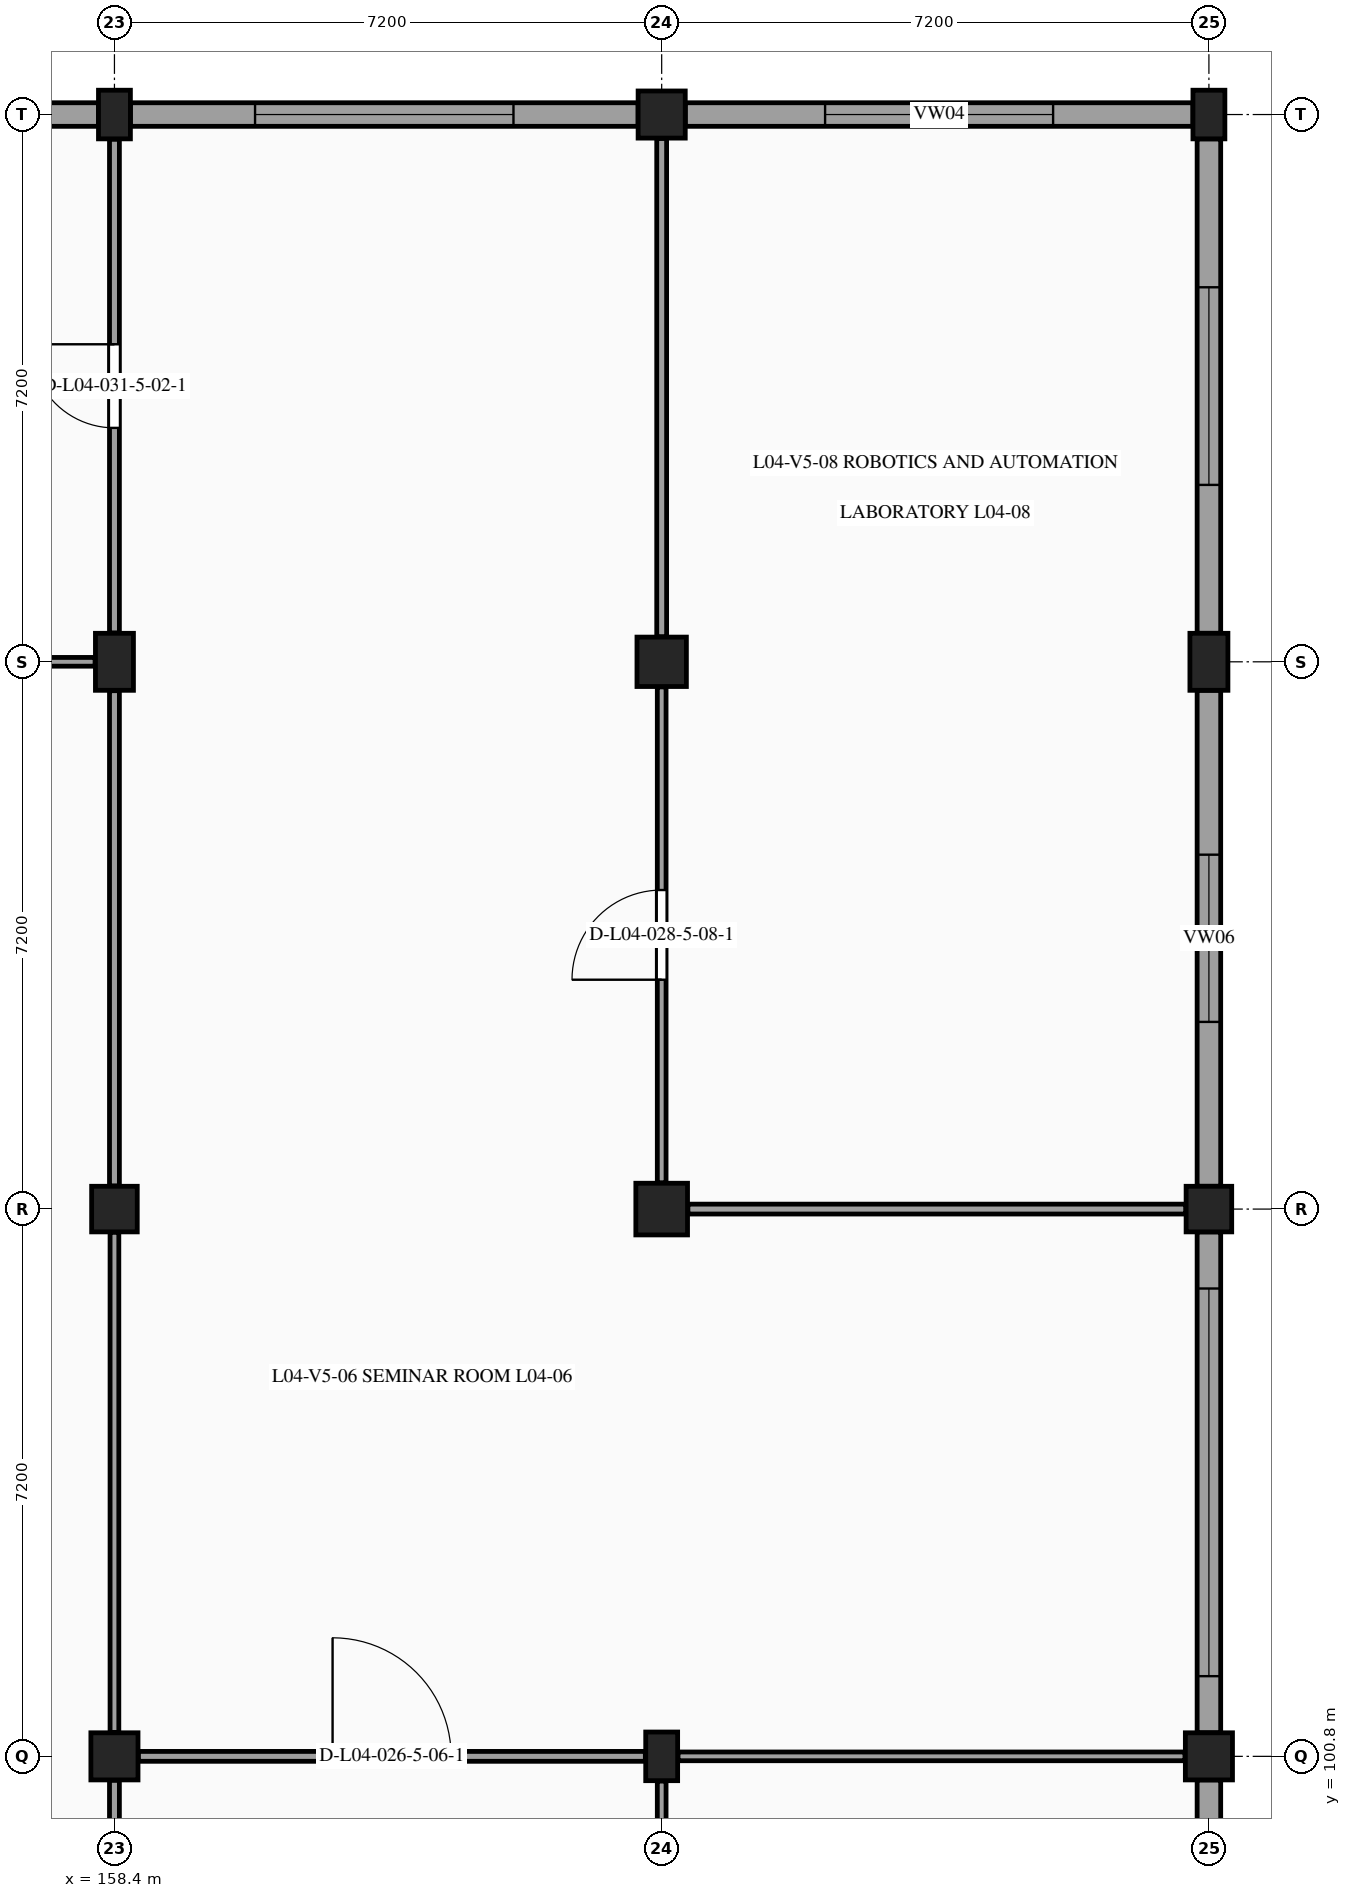
"""IFC4 building model, lengths in metres.
Left out: names, types, materials, properties, quantities, classifications, styles, units other than length and angle.
Written with IfcOpenShell. Run it as: python <this file> out.ifc"""

import sys

from ifc_helpers import new_model, si_unit, direction, frame, frame_2d, origin, origin_2d, place, context, subcontext, project, spatial, rectangle, extrude, element, fill, save


model = new_model("IFC4")
c1 = context("Model", 3, precision=1e-05, world=origin(), true_north=direction((0.0, 1.0)))
c2 = subcontext(c1, "Body", "Model", "MODEL_VIEW")
j1 = project(units=[si_unit("LENGTHUNIT", "METRE"), si_unit("PLANEANGLEUNIT", "RADIAN")], contexts=[c1])
p1 = place(None, origin())
s1 = spatial("IfcSite", under=j1, at=p1, CompositionType="ELEMENT")
p2 = place(p1, origin())
s2 = spatial("IfcBuilding", under=s1, at=p2, CompositionType="ELEMENT")
p3 = place(p2, frame((0.0, 0.0, 18.6)))
s3 = spatial("IfcBuildingStorey", under=s2, at=p3, CompositionType="ELEMENT", Elevation=18.6)
p4 = place(p3, frame((158.4, 100.8, 0.0), z_axis=(0.0, 0.0, 1.0), x_axis=(1.0, 0.0, 0.0)))
e1 = element("IfcColumn", 1, at=p4, inside=s3, PredefinedType="COLUMN", context=c2, shape_type="SweptSolid", body=[
    extrude(rectangle(XDim=0.62, YDim=0.62, at=origin_2d()), origin(), (0.0, 0.0, 1.0), 4.2),
])
p5 = place(p3, frame((158.4, 108.0, 0.0), z_axis=(0.0, 0.0, 1.0), x_axis=(1.0, 0.0, 0.0)))
e2 = element("IfcColumn", 2, at=p5, inside=s3, PredefinedType="COLUMN", context=c2, shape_type="SweptSolid", body=[
    extrude(rectangle(XDim=0.6, YDim=0.6, at=origin_2d()), origin(), (0.0, 0.0, 1.0), 4.2),
])
p6 = place(p3, frame((158.4, 115.2, 0.0), z_axis=(0.0, 0.0, 1.0), x_axis=(1.0, 0.0, 0.0)))
e3 = element("IfcColumn", 3, at=p6, inside=s3, PredefinedType="COLUMN", context=c2, shape_type="SweptSolid", body=[
    extrude(rectangle(XDim=0.5, YDim=0.75, at=origin_2d()), origin(), (0.0, 0.0, 1.0), 4.2),
])
for number, where, z_axis, x_axis in (
    (4, (158.4, 122.4, 0.0), (0.0, 0.0, 1.0), (1.0, 0.0, 0.0)),
    (5, (165.6, 100.8, 0.0), (0.0, 0.0, 1.0), (1.0, 0.0, 0.0)),
):
    element("IfcColumn", number, at=place(p3, frame(where, z_axis=z_axis, x_axis=x_axis)), inside=s3, PredefinedType="PILASTER", context=c2, shape_type="SweptSolid", body=[
        extrude(rectangle(XDim=0.42, YDim=0.64, at=origin_2d()), origin(), (0.0, 0.0, 1.0), 4.2),
    ])
p7 = place(p3, frame((165.6, 108.0, 0.0), z_axis=(0.0, 0.0, 1.0), x_axis=(1.0, 0.0, 0.0)))
e6 = element("IfcColumn", 6, at=p7, inside=s3, PredefinedType="COLUMN", context=c2, shape_type="SweptSolid", body=[
    extrude(rectangle(XDim=0.68, YDim=0.68, at=origin_2d()), origin(), (0.0, 0.0, 1.0), 4.2),
])
p8 = place(p3, frame((165.6, 115.2, 0.0), z_axis=(0.0, 0.0, 1.0), x_axis=(1.0, 0.0, 0.0)))
e7 = element("IfcColumn", 7, at=p8, inside=s3, PredefinedType="COLUMN", context=c2, shape_type="SweptSolid", body=[
    extrude(rectangle(XDim=0.65, YDim=0.65, at=origin_2d()), origin(), (0.0, 0.0, 1.0), 4.2),
])
for number, where, z_axis, x_axis in (
    (8, (165.6, 122.4, 0.0), (0.0, 0.0, 1.0), (1.0, 0.0, 0.0)),
    (9, (172.8, 100.8, 0.0), (0.0, 0.0, 1.0), (1.0, 0.0, 0.0)),
):
    element("IfcColumn", number, at=place(p3, frame(where, z_axis=z_axis, x_axis=x_axis)), inside=s3, PredefinedType="COLUMN", context=c2, shape_type="SweptSolid", body=[
        extrude(rectangle(XDim=0.62, YDim=0.62, at=origin_2d()), origin(), (0.0, 0.0, 1.0), 4.2),
    ])
p9 = place(p3, frame((172.8, 108.0, 0.0), z_axis=(0.0, 0.0, 1.0), x_axis=(1.0, 0.0, 0.0)))
e10 = element("IfcColumn", 10, at=p9, inside=s3, PredefinedType="COLUMN", context=c2, shape_type="SweptSolid", body=[
    extrude(rectangle(XDim=0.6, YDim=0.6, at=origin_2d()), origin(), (0.0, 0.0, 1.0), 4.2),
])
p10 = place(p3, frame((172.8, 115.2, 0.0), z_axis=(0.0, 0.0, 1.0), x_axis=(1.0, 0.0, 0.0)))
e11 = element("IfcColumn", 11, at=p10, inside=s3, PredefinedType="COLUMN", context=c2, shape_type="SweptSolid", body=[
    extrude(rectangle(XDim=0.5, YDim=0.75, at=origin_2d()), origin(), (0.0, 0.0, 1.0), 4.2),
])
p11 = place(p3, frame((172.8, 122.4, 0.0), z_axis=(0.0, 0.0, 1.0), x_axis=(1.0, 0.0, 0.0)))
e12 = element("IfcColumn", 12, at=p11, inside=s3, PredefinedType="PILASTER", context=c2, shape_type="SweptSolid", body=[
    extrude(rectangle(XDim=0.42, YDim=0.64, at=origin_2d()), origin(), (0.0, 0.0, 1.0), 4.2),
])
p12 = place(p3, frame((151.51, 122.4, 0.0), z_axis=(0.0, 0.0, 1.0), x_axis=(1.0, 0.0, 0.0)))
e13 = element("IfcWall", 13, at=p12, inside=s3, PredefinedType="STANDARD", context=c2, shape_type="SweptSolid", body=[
    extrude(rectangle(XDim=6.68, YDim=0.31, at=frame_2d((3.34, 0.0))), origin(), (0.0, 0.0, 1.0), 3.21),
])
p13 = place(p12, frame((1.34, 0.0, 0.98)))
e14 = element("IfcOpeningElement", 14, at=p13, cuts=e13, PredefinedType="OPENING", context=c2, shape_type="SweptSolid", body=[
    extrude(rectangle(XDim=4.0, YDim=1.55, at=frame_2d((2.0, 0.775))), frame((0.0, 0.165, 0.0), z_axis=(0.0, -1.0, 0.0), x_axis=(1.0, 0.0, 0.0)), (0.0, 0.0, 1.0), 0.33),
])
p14 = place(p3, frame((158.61, 122.4, 0.0), z_axis=(0.0, 0.0, 1.0), x_axis=(1.0, 0.0, 0.0)))
e15 = element("IfcWall", 15, at=p14, inside=s3, PredefinedType="STANDARD", context=c2, shape_type="SweptSolid", body=[
    extrude(rectangle(XDim=6.68, YDim=0.31, at=frame_2d((3.34, 0.0))), origin(), (0.0, 0.0, 1.0), 3.21),
])
p15 = place(p14, frame((1.64, 0.0, 0.98)))
e16 = element("IfcOpeningElement", 16, at=p15, cuts=e15, PredefinedType="OPENING", context=c2, shape_type="SweptSolid", body=[
    extrude(rectangle(XDim=3.4, YDim=1.55, at=frame_2d((1.7, 0.775))), frame((0.0, 0.165, 0.0), z_axis=(0.0, -1.0, 0.0), x_axis=(1.0, 0.0, 0.0)), (0.0, 0.0, 1.0), 0.33),
])
p16 = place(p3, frame((165.91, 122.4, 0.0), z_axis=(0.0, 0.0, 1.0), x_axis=(1.0, 0.0, 0.0)))
e17 = element("IfcWall", 17, at=p16, inside=s3, PredefinedType="STANDARD", context=c2, shape_type="SweptSolid", body=[
    extrude(rectangle(XDim=6.68, YDim=0.31, at=frame_2d((3.34, 0.0))), origin(), (0.0, 0.0, 1.0), 3.21),
])
p17 = place(p16, frame((1.84, 0.0, 0.98)))
e18 = element("IfcOpeningElement", 18, at=p17, cuts=e17, PredefinedType="OPENING", context=c2, shape_type="SweptSolid", body=[
    extrude(rectangle(XDim=3.0, YDim=1.5, at=frame_2d((1.5, 0.75))), frame((0.0, 0.165, 0.0), z_axis=(0.0, -1.0, 0.0), x_axis=(1.0, 0.0, 0.0)), (0.0, 0.0, 1.0), 0.33),
])
p18 = place(p3, frame((172.8, 122.08, 0.0), z_axis=(0.0, 0.0, 1.0), x_axis=(0.0, -1.0, 0.0)))
e19 = element("IfcWall", 19, at=p18, inside=s3, PredefinedType="STANDARD", context=c2, shape_type="SweptSolid", body=[
    extrude(rectangle(XDim=6.505, YDim=0.31, at=frame_2d((3.252, 0.0))), origin(), (0.0, 0.0, 1.0), 3.16),
])
p19 = place(p18, frame((1.952, 0.0, 0.98)))
e20 = element("IfcOpeningElement", 20, at=p19, cuts=e19, PredefinedType="OPENING", context=c2, shape_type="SweptSolid", body=[
    extrude(rectangle(XDim=2.6, YDim=1.5, at=frame_2d((1.3, 0.75))), frame((0.0, 0.165, 0.0), z_axis=(0.0, -1.0, 0.0), x_axis=(1.0, 0.0, 0.0)), (0.0, 0.0, 1.0), 0.33),
])
p20 = place(p3, frame((172.8, 114.825, 0.0), z_axis=(0.0, 0.0, 1.0), x_axis=(0.0, -1.0, 0.0)))
e21 = element("IfcWall", 21, at=p20, inside=s3, PredefinedType="STANDARD", context=c2, shape_type="SweptSolid", body=[
    extrude(rectangle(XDim=6.525, YDim=0.31, at=frame_2d((3.262, 0.0))), origin(), (0.0, 0.0, 1.0), 3.16),
])
p21 = place(p20, frame((2.163, 0.0, 0.98)))
e22 = element("IfcOpeningElement", 22, at=p21, cuts=e21, PredefinedType="OPENING", context=c2, shape_type="SweptSolid", body=[
    extrude(rectangle(XDim=2.2, YDim=1.45, at=frame_2d((1.1, 0.725))), frame((0.0, 0.165, 0.0), z_axis=(0.0, -1.0, 0.0), x_axis=(1.0, 0.0, 0.0)), (0.0, 0.0, 1.0), 0.33),
])
p22 = place(p3, frame((172.8, 107.7, 0.0), z_axis=(0.0, 0.0, 1.0), x_axis=(0.0, -1.0, 0.0)))
e23 = element("IfcWall", 23, at=p22, inside=s3, PredefinedType="STANDARD", context=c2, shape_type="SweptSolid", body=[
    extrude(rectangle(XDim=6.59, YDim=0.31, at=frame_2d((3.295, 0.0))), origin(), (0.0, 0.0, 1.0), 3.16),
])
p23 = place(p22, frame((0.745, 0.0, 0.98)))
e24 = element("IfcOpeningElement", 24, at=p23, cuts=e23, PredefinedType="OPENING", context=c2, shape_type="SweptSolid", body=[
    extrude(rectangle(XDim=5.1, YDim=1.75, at=frame_2d((2.55, 0.875))), frame((0.0, 0.165, 0.0), z_axis=(0.0, -1.0, 0.0), x_axis=(1.0, 0.0, 0.0)), (0.0, 0.0, 1.0), 0.33),
])
p24 = place(p3, frame((172.8, 100.49, 0.0), z_axis=(0.0, 0.0, 1.0), x_axis=(0.0, -1.0, 0.0)))
e25 = element("IfcWall", 25, at=p24, inside=s3, PredefinedType="STANDARD", context=c2, shape_type="SweptSolid", body=[
    extrude(rectangle(XDim=6.565, YDim=0.31, at=frame_2d((3.282, 0.0))), origin(), (0.0, 0.0, 1.0), 3.16),
])
p25 = place(p24, frame((1.083, 0.0, 0.98)))
e26 = element("IfcOpeningElement", 26, at=p25, cuts=e25, PredefinedType="OPENING", context=c2, shape_type="SweptSolid", body=[
    extrude(rectangle(XDim=4.4, YDim=1.65, at=frame_2d((2.2, 0.825))), frame((0.0, 0.165, 0.0), z_axis=(0.0, -1.0, 0.0), x_axis=(1.0, 0.0, 0.0)), (0.0, 0.0, 1.0), 0.33),
])
p26 = place(p3, frame((158.4, 93.93, 0.0), z_axis=(0.0, 0.0, 1.0), x_axis=(0.0, 1.0, 0.0)))
e27 = element("IfcWall", 27, at=p26, inside=s3, PredefinedType="PARTITIONING", context=c2, shape_type="SweptSolid", body=[
    extrude(rectangle(XDim=6.555, YDim=0.13, at=frame_2d((3.278, 0.0))), origin(), (0.0, 0.0, 1.0), 3.275),
])
p27 = place(p3, frame((158.4, 101.115, 0.0), z_axis=(0.0, 0.0, 1.0), x_axis=(0.0, 1.0, 0.0)))
e28 = element("IfcWall", 28, at=p27, inside=s3, PredefinedType="PARTITIONING", context=c2, shape_type="SweptSolid", body=[
    extrude(rectangle(XDim=6.58, YDim=0.115, at=frame_2d((3.29, 0.0))), origin(), (0.0, 0.0, 1.0), 3.27),
])
p28 = place(p3, frame((158.4, 108.305, 0.0), z_axis=(0.0, 0.0, 1.0), x_axis=(0.0, 1.0, 0.0)))
e29 = element("IfcWall", 29, at=p28, inside=s3, PredefinedType="PARTITIONING", context=c2, shape_type="SweptSolid", body=[
    extrude(rectangle(XDim=6.515, YDim=0.13, at=frame_2d((3.258, 0.0))), origin(), (0.0, 0.0, 1.0), 3.27),
])
p29 = place(p3, frame((151.53, 115.2, 0.0), z_axis=(0.0, 0.0, 1.0), x_axis=(1.0, 0.0, 0.0)))
e30 = element("IfcWall", 30, at=p29, inside=s3, PredefinedType="PARTITIONING", context=c2, shape_type="SweptSolid", body=[
    extrude(rectangle(XDim=6.615, YDim=0.115, at=frame_2d((3.308, 0.0))), origin(), (0.0, 0.0, 1.0), 3.265),
])
p30 = place(p3, frame((158.4, 115.58, 0.0), z_axis=(0.0, 0.0, 1.0), x_axis=(0.0, 1.0, 0.0)))
e31 = element("IfcWall", 31, at=p30, inside=s3, PredefinedType="PARTITIONING", context=c2, shape_type="SweptSolid", body=[
    extrude(rectangle(XDim=6.495, YDim=0.13, at=frame_2d((3.248, 0.0))), origin(), (0.0, 0.0, 1.0), 3.335),
])
p31 = place(p30, frame((2.698, 0.0, 0.0)))
e32 = element("IfcOpeningElement", 32, at=p31, cuts=e31, PredefinedType="OPENING", context=c2, shape_type="SweptSolid", body=[
    extrude(rectangle(XDim=1.1, YDim=2.15, at=frame_2d((0.55, 1.075))), frame((0.0, 0.075, 0.0), z_axis=(0.0, -1.0, 0.0), x_axis=(1.0, 0.0, 0.0)), (0.0, 0.0, 1.0), 0.15),
])
p32 = place(p3, frame((165.6, 93.98, 0.0), z_axis=(0.0, 0.0, 1.0), x_axis=(0.0, 1.0, 0.0)))
e33 = element("IfcWall", 33, at=p32, inside=s3, PredefinedType="PARTITIONING", context=c2, shape_type="SweptSolid", body=[
    extrude(rectangle(XDim=6.495, YDim=0.115, at=frame_2d((3.248, 0.0))), origin(), (0.0, 0.0, 1.0), 3.275),
])
p33 = place(p3, frame((158.715, 100.8, 0.0), z_axis=(0.0, 0.0, 1.0), x_axis=(1.0, 0.0, 0.0)))
e34 = element("IfcWall", 34, at=p33, inside=s3, PredefinedType="PARTITIONING", context=c2, shape_type="SweptSolid", body=[
    extrude(rectangle(XDim=6.67, YDim=0.13, at=frame_2d((3.335, 0.0))), origin(), (0.0, 0.0, 1.0), 3.305),
])
p34 = place(p33, frame((2.555, 0.0, 0.0)))
e35 = element("IfcOpeningElement", 35, at=p34, cuts=e34, PredefinedType="OPENING", context=c2, shape_type="SweptSolid", body=[
    extrude(rectangle(XDim=1.56, YDim=2.25, at=frame_2d((0.78, 1.125))), frame((0.0, 0.075, 0.0), z_axis=(0.0, -1.0, 0.0), x_axis=(1.0, 0.0, 0.0)), (0.0, 0.0, 1.0), 0.15),
])
p35 = place(p3, frame((165.6, 108.345, 0.0), z_axis=(0.0, 0.0, 1.0), x_axis=(0.0, 1.0, 0.0)))
e36 = element("IfcWall", 36, at=p35, inside=s3, PredefinedType="PARTITIONING", context=c2, shape_type="SweptSolid", body=[
    extrude(rectangle(XDim=6.525, YDim=0.115, at=frame_2d((3.263, 0.0))), origin(), (0.0, 0.0, 1.0), 3.27),
])
p36 = place(p35, frame((2.673, 0.0, 0.0)))
e37 = element("IfcOpeningElement", 37, at=p36, cuts=e36, PredefinedType="OPENING", context=c2, shape_type="SweptSolid", body=[
    extrude(rectangle(XDim=1.18, YDim=2.18, at=frame_2d((0.59, 1.09))), frame((0.0, 0.067, 0.0), z_axis=(0.0, -1.0, 0.0), x_axis=(1.0, 0.0, 0.0)), (0.0, 0.0, 1.0), 0.135),
])
p37 = place(p3, frame((165.6, 115.53, 0.0), z_axis=(0.0, 0.0, 1.0), x_axis=(0.0, 1.0, 0.0)))
e38 = element("IfcWall", 38, at=p37, inside=s3, PredefinedType="PARTITIONING", context=c2, shape_type="SweptSolid", body=[
    extrude(rectangle(XDim=6.555, YDim=0.13, at=frame_2d((3.277, 0.0))), origin(), (0.0, 0.0, 1.0), 3.335),
])
p38 = place(p3, frame((165.815, 100.8, 0.0), z_axis=(0.0, 0.0, 1.0), x_axis=(1.0, 0.0, 0.0)))
e39 = element("IfcWall", 39, at=p38, inside=s3, PredefinedType="PARTITIONING", context=c2, shape_type="SweptSolid", body=[
    extrude(rectangle(XDim=6.67, YDim=0.115, at=frame_2d((3.335, 0.0))), origin(), (0.0, 0.0, 1.0), 3.315),
])
p39 = place(p3, frame((165.945, 108.0, 0.0), z_axis=(0.0, 0.0, 1.0), x_axis=(1.0, 0.0, 0.0)))
e40 = element("IfcWall", 40, at=p39, inside=s3, PredefinedType="PARTITIONING", context=c2, shape_type="SweptSolid", body=[
    extrude(rectangle(XDim=6.55, YDim=0.13, at=frame_2d((3.275, 0.0))), origin(), (0.0, 0.0, 1.0), 3.315),
])
p40 = place(p15, origin())
e41 = element("IfcWindow", 41, at=p40, inside=s3, PartitioningType="SINGLE_PANEL", PredefinedType="WINDOW", context=c2, shape_type="SweptSolid", body=[
    extrude(rectangle(XDim=3.4, YDim=1.55, at=frame_2d((1.7, 0.775))), frame((0.0, -0.03, 0.0), z_axis=(0.0, -1.0, 0.0), x_axis=(1.0, 0.0, 0.0)), (0.0, 0.0, 1.0), 0.06),
])
fill(e16, e41)
p41 = place(p17, origin())
e42 = element("IfcWindow", 42, at=p41, inside=s3, PartitioningType="SINGLE_PANEL", PredefinedType="WINDOW", context=c2, shape_type="SweptSolid", body=[
    extrude(rectangle(XDim=3.0, YDim=1.5, at=frame_2d((1.5, 0.75))), frame((0.0, -0.03, 0.0), z_axis=(0.0, -1.0, 0.0), x_axis=(1.0, 0.0, 0.0)), (0.0, 0.0, 1.0), 0.06),
])
fill(e18, e42)
p42 = place(p19, origin())
e43 = element("IfcWindow", 43, at=p42, inside=s3, PartitioningType="SINGLE_PANEL", PredefinedType="WINDOW", context=c2, shape_type="SweptSolid", body=[
    extrude(rectangle(XDim=2.6, YDim=1.5, at=frame_2d((1.3, 0.75))), frame((0.0, -0.03, 0.0), z_axis=(0.0, -1.0, 0.0), x_axis=(1.0, 0.0, 0.0)), (0.0, 0.0, 1.0), 0.06),
])
fill(e20, e43)
p43 = place(p21, origin())
e44 = element("IfcWindow", 44, at=p43, inside=s3, PartitioningType="SINGLE_PANEL", PredefinedType="WINDOW", context=c2, shape_type="SweptSolid", body=[
    extrude(rectangle(XDim=2.2, YDim=1.45, at=frame_2d((1.1, 0.725))), frame((0.0, -0.03, 0.0), z_axis=(0.0, -1.0, 0.0), x_axis=(1.0, 0.0, 0.0)), (0.0, 0.0, 1.0), 0.06),
])
fill(e22, e44)
p44 = place(p23, origin())
e45 = element("IfcWindow", 45, at=p44, inside=s3, PartitioningType="SINGLE_PANEL", PredefinedType="WINDOW", context=c2, shape_type="SweptSolid", body=[
    extrude(rectangle(XDim=5.1, YDim=1.75, at=frame_2d((2.55, 0.875))), frame((0.0, -0.03, 0.0), z_axis=(0.0, -1.0, 0.0), x_axis=(1.0, 0.0, 0.0)), (0.0, 0.0, 1.0), 0.06),
])
fill(e24, e45)
p45 = place(p34, origin())
e46 = element("IfcDoor", 46, at=p45, inside=s3, OperationType="SINGLE_SWING_LEFT", PredefinedType="DOOR", context=c2, shape_type="SweptSolid", body=[
    extrude(rectangle(XDim=1.56, YDim=2.25, at=frame_2d((0.78, 1.125))), frame((0.0, 0.025, 0.0), z_axis=(0.0, -1.0, 0.0), x_axis=(1.0, 0.0, 0.0)), (0.0, 0.0, 1.0), 0.05),
])
fill(e35, e46)
p46 = place(p36, origin())
e47 = element("IfcDoor", 47, at=p46, inside=s3, OperationType="SINGLE_SWING_LEFT", PredefinedType="DOOR", context=c2, shape_type="SweptSolid", body=[
    extrude(rectangle(XDim=1.18, YDim=2.18, at=frame_2d((0.59, 1.09))), frame((0.0, 0.025, 0.0), z_axis=(0.0, -1.0, 0.0), x_axis=(1.0, 0.0, 0.0)), (0.0, 0.0, 1.0), 0.05),
])
fill(e37, e47)
p47 = place(p31, origin())
e48 = element("IfcDoor", 48, at=p47, inside=s3, OperationType="SINGLE_SWING_RIGHT", PredefinedType="DOOR", context=c2, shape_type="SweptSolid", body=[
    extrude(rectangle(XDim=1.1, YDim=2.15, at=frame_2d((0.55, 1.075))), frame((0.0, 0.025, 0.0), z_axis=(0.0, -1.0, 0.0), x_axis=(1.0, 0.0, 0.0)), (0.0, 0.0, 1.0), 0.05),
])
fill(e32, e48)
save(model, sys.argv[1])
